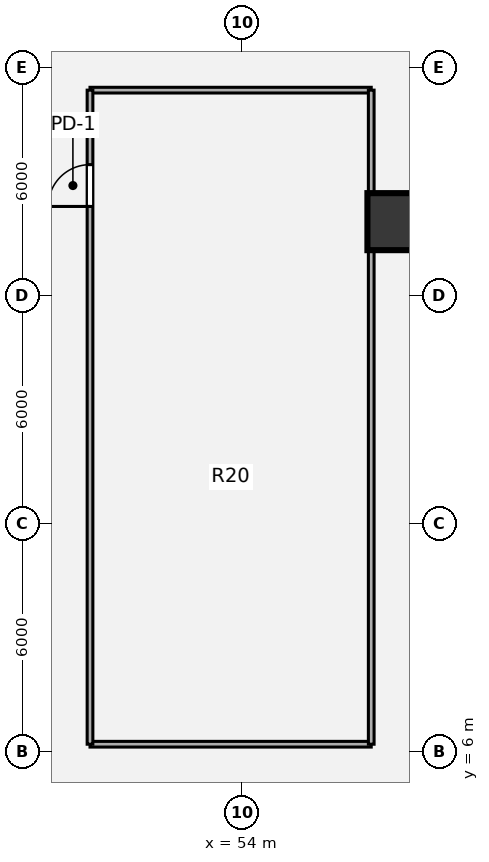
"""IFC4 building model, lengths in metres.
Left out: names, types, materials, properties, quantities, classifications, styles, units other than length and angle.
Written with IfcOpenShell. Run it as: python <this file> out.ifc"""

import sys

from ifc_helpers import new_model, si_unit, direction, frame, frame_2d, origin, origin_2d, place, context, subcontext, project, spatial, rectangle, hollow_circle, extrude, source, transform, mapped, element, fill, save


model = new_model("IFC4")
c1 = context("Model", 3, precision=1e-05, world=origin(), true_north=direction((0.0, 1.0)))
c2 = subcontext(c1, "Body", "Model", "MODEL_VIEW")
j1 = project(units=[si_unit("LENGTHUNIT", "METRE"), si_unit("PLANEANGLEUNIT", "RADIAN")], contexts=[c1])
p1 = place(None, origin())
s1 = spatial("IfcSite", under=j1, at=p1, CompositionType="ELEMENT")
p2 = place(p1, origin())
s2 = spatial("IfcBuilding", under=s1, at=p2, CompositionType="ELEMENT")
p3 = place(p2, frame((0.0, 0.0, 22.68)))
s3 = spatial("IfcBuildingStorey", under=s2, at=p3, CompositionType="ELEMENT", Elevation=22.68)
m1 = source(origin(), c2, "Body", "SweptSolid", [
    extrude(hollow_circle(Radius=0.75, WallThickness=0.05, at=origin_2d()), origin(), (0.0, 0.0, 1.0), 4.32),
])
p4 = place(p3, frame((58.05, 19.95, 0.0), z_axis=(0.0, 0.0, 1.0), x_axis=(1.0, 0.0, 0.0)))
e1 = element("IfcColumn", 1, at=p4, inside=s3, PredefinedType="COLUMN", context=c2, shape_type="MappedRepresentation", body=[
    mapped(m1, transform((0.0, 0.0, 0.0), x_axis=(1.0, 0.0, 0.0), y_axis=(0.0, 1.0, 0.0), z_axis=(0.0, 0.0, 1.0), scale=1.0)),
])
p5 = place(p3, frame((50.0, 6.2, 0.0), z_axis=(0.0, 0.0, 1.0), x_axis=(1.0, 0.0, 0.0)))
e2 = element("IfcWall", 2, at=p5, inside=s3, PredefinedType="PARTITIONING", context=c2, shape_type="SweptSolid", body=[
    extrude(rectangle(XDim=7.4, YDim=0.15, at=frame_2d((3.7, 0.0))), origin(), (0.0, 0.0, 1.0), 2.185),
])
p6 = place(p3, frame((50.0, 23.41, 0.0), z_axis=(0.0, 0.0, 1.0), x_axis=(1.0, 0.0, 0.0)))
e3 = element("IfcWall", 3, at=p6, inside=s3, PredefinedType="PARTITIONING", context=c2, shape_type="SweptSolid", body=[
    extrude(rectangle(XDim=7.4, YDim=0.15, at=frame_2d((3.7, 0.0))), origin(), (0.0, 0.0, 1.0), 3.97),
])
p7 = place(p3, frame((50.0, 6.2, 0.0), z_axis=(0.0, 0.0, 1.0), x_axis=(0.0, 1.0, 0.0)))
e4 = element("IfcWall", 4, at=p7, inside=s3, PredefinedType="PARTITIONING", context=c2, shape_type="SweptSolid", body=[
    extrude(rectangle(XDim=17.21, YDim=0.15, at=frame_2d((8.605, 0.0))), origin(), (0.0, 0.0, 1.0), 3.678),
])
p8 = place(p7, frame((14.15, 0.0, 0.0)))
e5 = element("IfcOpeningElement", 5, at=p8, cuts=e4, PredefinedType="OPENING", context=c2, shape_type="SweptSolid", body=[
    extrude(rectangle(XDim=1.1, YDim=2.1, at=origin_2d()), frame((0.55, 0.085, 1.05), z_axis=(0.0, -1.0, 0.0), x_axis=(1.0, 0.0, 0.0)), (0.0, 0.0, 1.0), 0.17),
])
p9 = place(p3, frame((57.4, 6.2, 0.0), z_axis=(0.0, 0.0, 1.0), x_axis=(0.0, 1.0, 0.0)))
e6 = element("IfcWall", 6, at=p9, inside=s3, PredefinedType="PARTITIONING", context=c2, shape_type="SweptSolid", body=[
    extrude(rectangle(XDim=17.21, YDim=0.15, at=frame_2d((8.605, 0.0))), origin(), (0.0, 0.0, 1.0), 3.97),
])
m2 = source(origin(), c2, "Body", "SweptSolid", [
    extrude(rectangle(XDim=1.1, YDim=2.1, at=origin_2d()), frame((0.55, 0.025, 1.05), z_axis=(0.0, -1.0, 0.0), x_axis=(1.0, 0.0, 0.0)), (0.0, 0.0, 1.0), 0.05),
])
p10 = place(p8, origin())
e7 = element("IfcDoor", 7, at=p10, inside=s3, OperationType="SINGLE_SWING_LEFT", PredefinedType="DOOR", context=c2, shape_type="MappedRepresentation", body=[
    mapped(m2, transform((0.0, 0.0, 0.0), x_axis=(1.0, 0.0, 0.0), y_axis=(0.0, 1.0, 0.0), z_axis=(0.0, 0.0, 1.0), scale=1.0)),
])
fill(e5, e7)
save(model, sys.argv[1])
